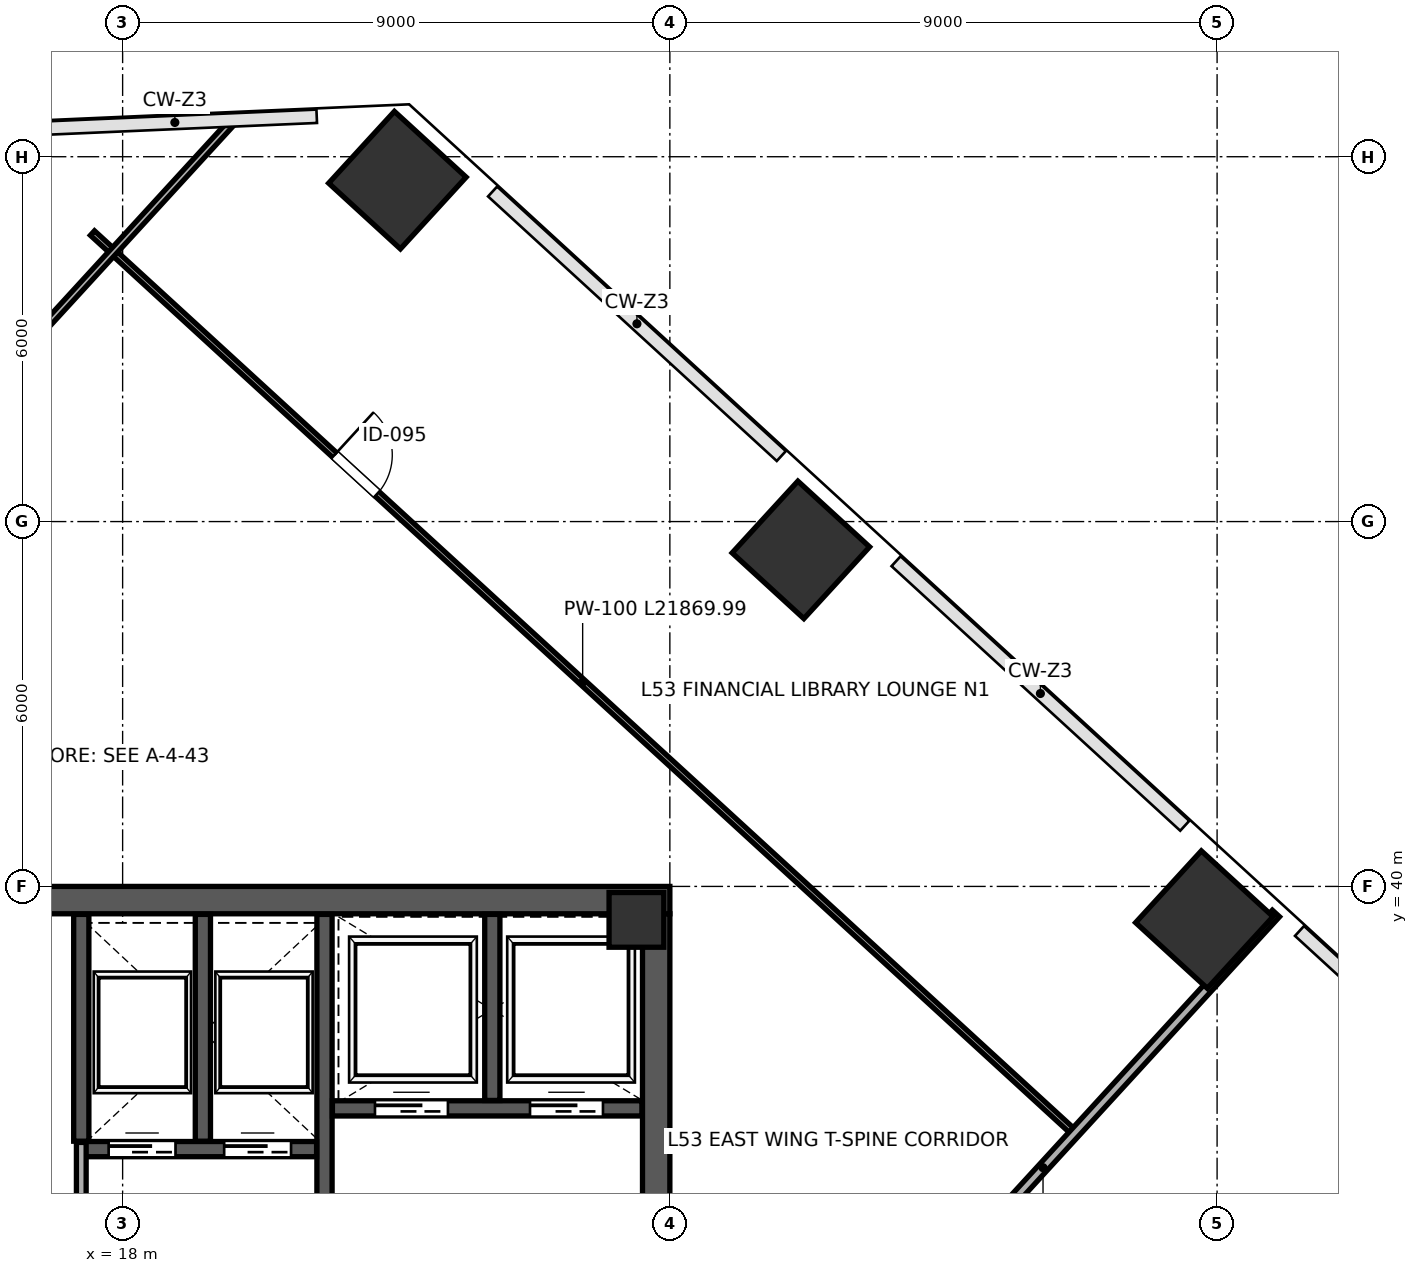
"""IFC4 building model, lengths in metres.
Left out: names, types, materials, properties, quantities, classifications, styles, units other than length and angle.
Written with IfcOpenShell. Run it as: python <this file> out.ifc"""

import sys

from ifc_helpers import new_model, si_unit, direction, frame, frame_2d, origin, origin_2d, place, context, subcontext, project, spatial, rectangle, extrude, source, transform, mapped, element, fill, save


model = new_model("IFC4")
c1 = context("Model", 3, precision=1e-05, world=origin(), true_north=direction((0.0, 1.0)))
c2 = subcontext(c1, "Body", "Model", "MODEL_VIEW")
j1 = project(units=[si_unit("LENGTHUNIT", "METRE"), si_unit("PLANEANGLEUNIT", "RADIAN")], contexts=[c1])
p1 = place(None, origin())
s1 = spatial("IfcSite", under=j1, at=p1, CompositionType="ELEMENT")
p2 = place(p1, origin())
s2 = spatial("IfcBuilding", under=s1, at=p2, CompositionType="ELEMENT")
p3 = place(p2, frame((0.0, 0.0, 237.4)))
s3 = spatial("IfcBuildingStorey", under=s2, at=p3, CompositionType="ELEMENT", Elevation=237.4)
m1 = source(origin(), c2, "Body", "SweptSolid", [
    extrude(rectangle(XDim=0.9, YDim=0.9, at=origin_2d()), origin(), (0.0, 0.0, 1.0), 4.199),
])
p4 = place(p3, frame((26.45, 39.45, 0.001), z_axis=(0.0, 0.0, 1.0), x_axis=(1.0, 0.0, 0.0)))
e1 = element("IfcColumn", 1, at=p4, inside=s3, PredefinedType="COLUMN", context=c2, shape_type="MappedRepresentation", body=[
    mapped(m1, transform((0.0, 0.0, 0.0), scale=1.0)),
])
m2 = source(origin(), c2, "Body", "SweptSolid", [
    extrude(rectangle(XDim=1.6, YDim=1.6, at=origin_2d()), origin(), (0.0, 0.0, 1.0), 4.199),
])
for number, where, z_axis, x_axis in (
    (2, (22.519, 51.615, 0.001), (0.0, 0.0, 1.0), (-0.737, 0.676, 0.0)),
    (3, (29.155, 45.534, 0.001), (0.0, 0.0, 1.0), (-0.737, 0.676, 0.0)),
    (4, (35.79, 39.454, 0.001), (0.0, 0.0, 1.0), (-0.737, 0.676, 0.0)),
):
    element("IfcColumn", number, at=place(p3, frame(where, z_axis=z_axis, x_axis=x_axis)), inside=s3, PredefinedType="COLUMN", context=c2, shape_type="MappedRepresentation", body=[
        mapped(m2, transform((0.0, 0.0, 0.0), scale=1.0)),
    ])
p5 = place(p3, frame((26.775, 24.45, 0.0), z_axis=(0.0, 0.0, 1.0), x_axis=(0.0, 1.0, 0.0)))
e5 = element("IfcWall", 5, at=p5, inside=s3, PredefinedType="SHEAR", context=c2, shape_type="SweptSolid", body=[
    extrude(rectangle(XDim=15.1, YDim=0.45, at=frame_2d((7.55, 0.0))), origin(), (0.0, 0.0, 1.0), 3.96),
])
p6 = place(p5, frame((8.6, 0.0, 0.0)))
e6 = element("IfcOpeningElement", 6, at=p6, cuts=e5, PredefinedType="OPENING", context=c2, shape_type="SweptSolid", body=[
    extrude(rectangle(XDim=1.15, YDim=2.2, at=frame_2d((0.575, 1.1))), frame((0.0, 0.235, 0.0), z_axis=(0.0, -1.0, 0.0), x_axis=(1.0, 0.0, 0.0)), (0.0, 0.0, 1.0), 0.47),
])
p7 = place(p3, frame((9.0, 39.775, 0.0), z_axis=(0.0, 0.0, 1.0), x_axis=(1.0, 0.0, 0.0)))
e7 = element("IfcWall", 7, at=p7, inside=s3, PredefinedType="SHEAR", context=c2, shape_type="SweptSolid", body=[
    extrude(rectangle(XDim=18.0, YDim=0.45, at=frame_2d((9.0, 0.0))), origin(), (0.0, 0.0, 1.0), 3.96),
])
p8 = place(p3, frame((21.32, 32.12, 0.0), z_axis=(0.0, 0.0, 1.0), x_axis=(0.0, 1.0, 0.0)))
e8 = element("IfcWall", 8, at=p8, inside=s3, PredefinedType="SHEAR", context=c2, shape_type="SweptSolid", body=[
    extrude(rectangle(XDim=7.42, YDim=0.25, at=frame_2d((3.71, 0.0))), origin(), (0.0, 0.0, 1.0), 3.96),
])
p9 = place(p8, frame((1.4, 0.0, 0.0)))
e9 = element("IfcOpeningElement", 9, at=p9, cuts=e8, PredefinedType="OPENING", context=c2, shape_type="SweptSolid", body=[
    extrude(rectangle(XDim=1.15, YDim=2.2, at=frame_2d((0.575, 1.1))), frame((0.0, 0.135, 0.0), z_axis=(0.0, -1.0, 0.0), x_axis=(1.0, 0.0, 0.0)), (0.0, 0.0, 1.0), 0.27),
])
p10 = place(p3, frame((21.45, 36.35, 0.0), z_axis=(0.0, 0.0, 1.0), x_axis=(1.0, 0.0, 0.0)))
e10 = element("IfcWall", 10, at=p10, inside=s3, PredefinedType="SHEAR", context=c2, shape_type="SweptSolid", body=[
    extrude(rectangle(XDim=5.09, YDim=0.25, at=frame_2d((2.545, 0.0))), origin(), (0.0, 0.0, 1.0), 3.96),
])
p11 = place(p10, frame((0.7, 0.0, 0.0)))
e11 = element("IfcOpeningElement", 11, at=p11, cuts=e10, PredefinedType="OPENING", context=c2, shape_type="SweptSolid", body=[
    extrude(rectangle(XDim=1.2, YDim=2.2, at=frame_2d((0.6, 1.1))), frame((0.0, 0.135, 0.0), z_axis=(0.0, -1.0, 0.0), x_axis=(1.0, 0.0, 0.0)), (0.0, 0.0, 1.0), 0.27),
])
p12 = place(p10, frame((3.25, 0.0, 0.0)))
e12 = element("IfcOpeningElement", 12, at=p12, cuts=e10, PredefinedType="OPENING", context=c2, shape_type="SweptSolid", body=[
    extrude(rectangle(XDim=1.2, YDim=2.2, at=frame_2d((0.6, 1.1))), frame((0.0, 0.135, 0.0), z_axis=(0.0, -1.0, 0.0), x_axis=(1.0, 0.0, 0.0)), (0.0, 0.0, 1.0), 0.27),
])
p13 = place(p3, frame((24.08, 36.48, 0.0), z_axis=(0.0, 0.0, 1.0), x_axis=(0.0, 1.0, 0.0)))
e13 = element("IfcWall", 13, at=p13, inside=s3, PredefinedType="SHEAR", context=c2, shape_type="SweptSolid", body=[
    extrude(rectangle(XDim=3.06, YDim=0.25, at=frame_2d((1.53, 0.0))), origin(), (0.0, 0.0, 1.0), 3.96),
])
p14 = place(p3, frame((17.32, 35.68, 0.0), z_axis=(0.0, 0.0, 1.0), x_axis=(1.0, 0.0, 0.0)))
e14 = element("IfcWall", 14, at=p14, inside=s3, PredefinedType="SHEAR", context=c2, shape_type="SweptSolid", body=[
    extrude(rectangle(XDim=3.87, YDim=0.25, at=frame_2d((1.935, 0.0))), origin(), (0.0, 0.0, 1.0), 3.96),
])
p15 = place(p14, frame((0.45, 0.0, 0.0)))
e15 = element("IfcOpeningElement", 15, at=p15, cuts=e14, PredefinedType="OPENING", context=c2, shape_type="SweptSolid", body=[
    extrude(rectangle(XDim=1.1, YDim=2.2, at=frame_2d((0.55, 1.1))), frame((0.0, 0.135, 0.0), z_axis=(0.0, -1.0, 0.0), x_axis=(1.0, 0.0, 0.0)), (0.0, 0.0, 1.0), 0.27),
])
p16 = place(p14, frame((2.35, 0.0, 0.0)))
e16 = element("IfcOpeningElement", 16, at=p16, cuts=e14, PredefinedType="OPENING", context=c2, shape_type="SweptSolid", body=[
    extrude(rectangle(XDim=1.1, YDim=2.2, at=frame_2d((0.55, 1.1))), frame((0.0, 0.135, 0.0), z_axis=(0.0, -1.0, 0.0), x_axis=(1.0, 0.0, 0.0)), (0.0, 0.0, 1.0), 0.27),
])
for number, where, z_axis, x_axis in (
    (17, (17.32, 35.81, 0.0), (0.0, 0.0, 1.0), (0.0, 1.0, 0.0)),
    (18, (19.32, 35.81, 0.0), (0.0, 0.0, 1.0), (0.0, 1.0, 0.0)),
):
    element("IfcWall", number, at=place(p3, frame(where, z_axis=z_axis, x_axis=x_axis)), inside=s3, PredefinedType="SHEAR", context=c2, shape_type="SweptSolid", body=[
        extrude(rectangle(XDim=3.73, YDim=0.25, at=frame_2d((1.865, 0.0))), origin(), (0.0, 0.0, 1.0), 3.96),
    ])
p17 = place(p3, frame((17.32, 33.86, 0.0), z_axis=(0.0, 0.0, 1.0), x_axis=(0.0, 1.0, 0.0)))
e19 = element("IfcWall", 19, at=p17, inside=s3, PredefinedType="PARTITIONING", context=c2, shape_type="SweptSolid", body=[
    extrude(rectangle(XDim=1.93, YDim=0.16, at=frame_2d((0.965, 0.0))), origin(), (0.0, 0.0, 1.0), 3.96),
])
p18 = place(p3, frame((17.504, 50.744, 0.0), z_axis=(0.0, 0.0, 1.0), x_axis=(0.737277850523, -0.675589646996, 0.0)))
e20 = element("IfcWall", 20, at=p18, inside=s3, PredefinedType="PARTITIONING", context=c2, shape_type="SweptSolid", body=[
    extrude(rectangle(XDim=21.87, YDim=0.1, at=frame_2d((10.935, 0.0))), origin(), (0.0, 0.0, 1.0), 3.96),
])
p19 = place(p18, frame((5.4, 0.0, 0.0)))
e21 = element("IfcOpeningElement", 21, at=p19, cuts=e20, PredefinedType="OPENING", context=c2, shape_type="SweptSolid", body=[
    extrude(rectangle(XDim=0.95, YDim=2.15, at=frame_2d((0.475, 1.075))), frame((0.0, 0.06, 0.0), z_axis=(0.0, -1.0, 0.0), x_axis=(1.0, 0.0, 0.0)), (0.0, 0.0, 1.0), 0.12),
])
p20 = place(p3, frame((1.73, 32.85, 0.0), z_axis=(0.0, 0.0, 1.0), x_axis=(0.675589845589, 0.737277668546, 0.0)))
e22 = element("IfcWall", 22, at=p20, inside=s3, PredefinedType="PARTITIONING", context=c2, shape_type="SweptSolid", body=[
    extrude(rectangle(XDim=26.742, YDim=0.115, at=frame_2d((13.371, 0.0))), origin(), (0.0, 0.0, 1.0), 3.96),
])
p21 = place(p3, frame((29.307, 31.194, 0.0), z_axis=(0.0, 0.0, 1.0), x_axis=(0.67558228032, 0.73728460076, 0.0)))
e23 = element("IfcWall", 23, at=p21, inside=s3, PredefinedType="PARTITIONING", context=c2, shape_type="SweptSolid", body=[
    extrude(rectangle(XDim=11.34, YDim=0.16, at=frame_2d((5.67, 0.0))), origin(), (0.0, 0.0, 1.0), 3.195),
])
m3 = source(origin(), c2, "Body", "SweptSolid", [
    extrude(rectangle(XDim=1.1, YDim=2.2, at=frame_2d((0.55, 1.1))), frame((0.0, 0.025, 0.0), z_axis=(0.0, -1.0, 0.0), x_axis=(1.0, 0.0, 0.0)), (0.0, 0.0, 1.0), 0.05),
])
p22 = place(p15, origin())
e24 = element("IfcDoor", 24, at=p22, inside=s3, OperationType="SLIDING_TO_LEFT", PredefinedType="DOOR", context=c2, shape_type="MappedRepresentation", body=[
    mapped(m3, transform((0.0, 0.0, 0.0), scale=1.0)),
])
fill(e15, e24)
p23 = place(p16, origin())
e25 = element("IfcDoor", 25, at=p23, inside=s3, OperationType="SLIDING_TO_RIGHT", PredefinedType="DOOR", context=c2, shape_type="MappedRepresentation", body=[
    mapped(m3, transform((0.0, 0.0, 0.0), scale=1.0)),
])
fill(e16, e25)
m4 = source(origin(), c2, "Body", "SweptSolid", [
    extrude(rectangle(XDim=1.2, YDim=2.2, at=frame_2d((0.6, 1.1))), frame((0.0, 0.025, 0.0), z_axis=(0.0, -1.0, 0.0), x_axis=(1.0, 0.0, 0.0)), (0.0, 0.0, 1.0), 0.05),
])
p24 = place(p11, origin())
e26 = element("IfcDoor", 26, at=p24, inside=s3, OperationType="SLIDING_TO_LEFT", PredefinedType="DOOR", context=c2, shape_type="MappedRepresentation", body=[
    mapped(m4, transform((0.0, 0.0, 0.0), scale=1.0)),
])
fill(e11, e26)
p25 = place(p12, origin())
e27 = element("IfcDoor", 27, at=p25, inside=s3, OperationType="SLIDING_TO_RIGHT", PredefinedType="DOOR", context=c2, shape_type="MappedRepresentation", body=[
    mapped(m4, transform((0.0, 0.0, 0.0), scale=1.0)),
])
fill(e12, e27)
m5 = source(origin(), c2, "Body", "SweptSolid", [
    extrude(rectangle(XDim=0.95, YDim=2.15, at=frame_2d((0.475, 1.075))), frame((0.0, 0.025, 0.0), z_axis=(0.0, -1.0, 0.0), x_axis=(1.0, 0.0, 0.0)), (0.0, 0.0, 1.0), 0.05),
])
p26 = place(p19, origin())
e28 = element("IfcDoor", 28, at=p26, inside=s3, OperationType="SINGLE_SWING_LEFT", PredefinedType="DOOR", context=c2, shape_type="MappedRepresentation", body=[
    mapped(m5, transform((0.0, 0.0, 0.0), scale=1.0)),
])
fill(e21, e28)
save(model, sys.argv[1])
